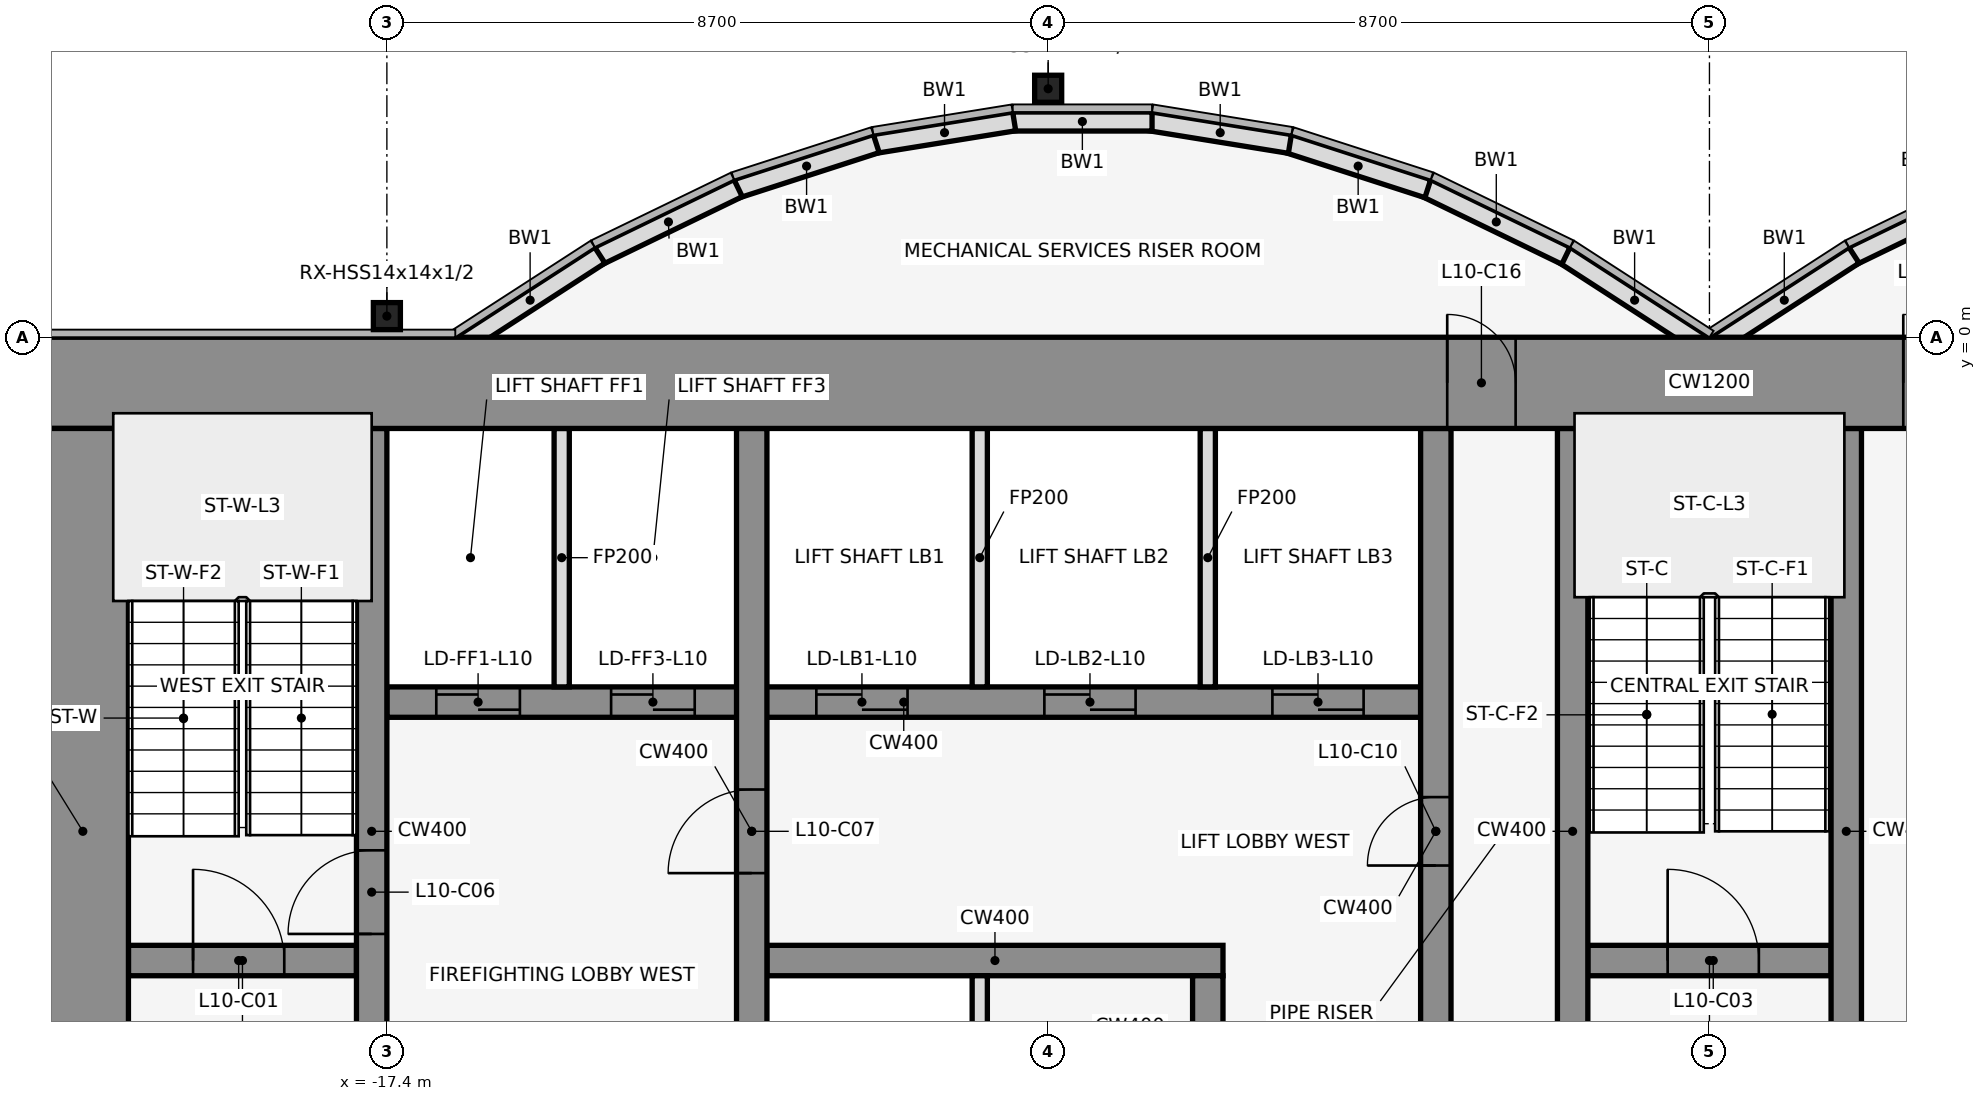
"""IFC4 building model, lengths in metres.
Left out: names, types, materials, properties, quantities, classifications, styles, units other than length and angle.
Written with IfcOpenShell. Run it as: python <this file> out.ifc"""

import sys

from ifc_helpers import new_model, si_unit, direction, frame, frame_2d, origin, origin_2d, place, context, subcontext, project, spatial, rectangle, hollow_rectangle, extrude, element, fill, save


model = new_model("IFC4")
c1 = context("Model", 3, precision=1e-05, world=origin(), true_north=direction((0.0, 1.0)))
c2 = subcontext(c1, "Body", "Model", "MODEL_VIEW")
j1 = project(units=[si_unit("LENGTHUNIT", "METRE"), si_unit("PLANEANGLEUNIT", "RADIAN")], contexts=[c1])
p1 = place(None, origin())
s1 = spatial("IfcSite", under=j1, at=p1, CompositionType="ELEMENT")
p2 = place(p1, origin())
s2 = spatial("IfcBuilding", under=s1, at=p2, CompositionType="ELEMENT")
p3 = place(p2, frame((0.0, 0.0, 53.0)))
s3 = spatial("IfcBuildingStorey", under=s2, at=p3, CompositionType="ELEMENT", Elevation=53.0)
for number, where, z_axis, x_axis in (
    (1, (-8.7, 3.269, 0.0), (0.0, 0.0, 1.0), (1.0, 0.0, 0.0)),
    (2, (-17.4, 0.278, 0.0), (0.0, 0.0, 1.0), (1.0, 0.0, 0.0)),
):
    element("IfcColumn", number, at=place(p3, frame(where, z_axis=z_axis, x_axis=x_axis)), inside=s3, PredefinedType="COLUMN", context=c2, shape_type="SweptSolid", body=[
        extrude(hollow_rectangle(XDim=0.356, YDim=0.356, WallThickness=0.012, at=origin_2d()), origin(), (0.0, 0.0, 1.0), 4.5),
    ])
p4 = place(p3, frame((3.721, 1.962, 0.0), z_axis=(0.0, 0.0, 1.0), x_axis=(-0.89982408427, -0.436252928206, 0.0)))
e3 = element("IfcWall", 3, at=p4, inside=s3, PredefinedType="STANDARD", context=c2, shape_type="SweptSolid", body=[
    extrude(rectangle(XDim=2.038, YDim=0.25, at=frame_2d((1.019, 0.0))), origin(), (0.0, 0.0, 1.0), 4.35),
])
for number, where, z_axis, x_axis in (
    (4, (1.901, 1.08, 0.0), (0.0, 0.0, 1.0), (-0.84, -0.543, 0.0)),
    (5, (-0.068, -0.105, 0.0), (0.0, 0.0, 1.0), (-0.84, 0.543, 0.0)),
):
    element("IfcWall", number, at=place(p3, frame(where, z_axis=z_axis, x_axis=x_axis)), inside=s3, PredefinedType="STANDARD", context=c2, shape_type="SweptSolid", body=[
        extrude(rectangle(XDim=2.183, YDim=0.25, at=frame_2d((1.091, 0.0))), origin(), (0.0, 0.0, 1.0), 4.35),
    ])
p5 = place(p3, frame((-1.888, 1.073, 0.0), z_axis=(0.0, 0.0, 1.0), x_axis=(-0.89982408427, 0.436252928206, 0.0)))
e6 = element("IfcWall", 6, at=p5, inside=s3, PredefinedType="STANDARD", context=c2, shape_type="SweptSolid", body=[
    extrude(rectangle(XDim=2.038, YDim=0.25, at=frame_2d((1.019, 0.0))), origin(), (0.0, 0.0, 1.0), 4.35),
])
p6 = place(p3, frame((-3.705, 1.955, 0.0), z_axis=(0.0, 0.0, 1.0), x_axis=(-0.951495806175, 0.307661714928, 0.0)))
e7 = element("IfcWall", 7, at=p6, inside=s3, PredefinedType="STANDARD", context=c2, shape_type="SweptSolid", body=[
    extrude(rectangle(XDim=1.927, YDim=0.25, at=frame_2d((0.963, 0.0))), origin(), (0.0, 0.0, 1.0), 4.35),
])
p7 = place(p3, frame((-5.52, 2.543, 0.0), z_axis=(0.0, 0.0, 1.0), x_axis=(-0.987181718931, 0.159600293885, 0.0)))
e8 = element("IfcWall", 8, at=p7, inside=s3, PredefinedType="STANDARD", context=c2, shape_type="SweptSolid", body=[
    extrude(rectangle(XDim=1.857, YDim=0.25, at=frame_2d((0.929, 0.0))), origin(), (0.0, 0.0, 1.0), 4.35),
])
p8 = place(p3, frame((-7.333, 2.838, 0.0), z_axis=(0.0, 0.0, 1.0), x_axis=(-1.0, 0.0, 0.0)))
e9 = element("IfcWall", 9, at=p8, inside=s3, PredefinedType="STANDARD", context=c2, shape_type="SweptSolid", body=[
    extrude(rectangle(XDim=1.833, YDim=0.25, at=frame_2d((0.917, 0.0))), origin(), (0.0, 0.0, 1.0), 4.35),
])
p9 = place(p3, frame((-9.147, 2.84, 0.0), z_axis=(0.0, 0.0, 1.0), x_axis=(-0.987181718931, -0.159600293885, 0.0)))
e10 = element("IfcWall", 10, at=p9, inside=s3, PredefinedType="STANDARD", context=c2, shape_type="SweptSolid", body=[
    extrude(rectangle(XDim=1.857, YDim=0.25, at=frame_2d((0.929, 0.0))), origin(), (0.0, 0.0, 1.0), 4.35),
])
p10 = place(p3, frame((-10.962, 2.548, 0.0), z_axis=(0.0, 0.0, 1.0), x_axis=(-0.951495806175, -0.307661714928, 0.0)))
e11 = element("IfcWall", 11, at=p10, inside=s3, PredefinedType="STANDARD", context=c2, shape_type="SweptSolid", body=[
    extrude(rectangle(XDim=1.927, YDim=0.25, at=frame_2d((0.963, 0.0))), origin(), (0.0, 0.0, 1.0), 4.35),
])
p11 = place(p3, frame((-12.779, 1.962, 0.0), z_axis=(0.0, 0.0, 1.0), x_axis=(-0.89982408427, -0.436252928206, 0.0)))
e12 = element("IfcWall", 12, at=p11, inside=s3, PredefinedType="STANDARD", context=c2, shape_type="SweptSolid", body=[
    extrude(rectangle(XDim=2.038, YDim=0.25, at=frame_2d((1.019, 0.0))), origin(), (0.0, 0.0, 1.0), 4.35),
])
p12 = place(p3, frame((-14.599, 1.08, 0.0), z_axis=(0.0, 0.0, 1.0), x_axis=(-0.83981312244, -0.542875602121, 0.0)))
e13 = element("IfcWall", 13, at=p12, inside=s3, PredefinedType="STANDARD", context=c2, shape_type="SweptSolid", body=[
    extrude(rectangle(XDim=2.183, YDim=0.25, at=frame_2d((1.091, 0.0))), origin(), (0.0, 0.0, 1.0), 4.35),
])
p13 = place(p3, frame((-20.8, -8.2, 0.0), z_axis=(0.0, 0.0, 1.0), x_axis=(1.0, 0.0, 0.0)))
e14 = element("IfcWall", 14, at=p13, inside=s3, PredefinedType="SHEAR", context=c2, shape_type="SweptSolid", body=[
    extrude(rectangle(XDim=3.0, YDim=0.4, at=frame_2d((1.5, 0.0))), origin(), (0.0, 0.0, 1.0), 4.5),
])
p14 = place(p13, frame((0.85, 0.0, 0.0)))
e15 = element("IfcOpeningElement", 15, at=p14, cuts=e14, PredefinedType="OPENING", context=c2, shape_type="SweptSolid", body=[
    extrude(rectangle(XDim=1.2, YDim=2.1, at=frame_2d((0.6, 1.05))), frame((0.0, 0.212, 0.0), z_axis=(0.0, -1.0, 0.0), x_axis=(1.0, 0.0, 0.0)), (0.0, 0.0, 1.0), 0.424),
])
p15 = place(p3, frame((-12.4, -8.2, 0.0), z_axis=(0.0, 0.0, 1.0), x_axis=(1.0, 0.0, 0.0)))
e16 = element("IfcWall", 16, at=p15, inside=s3, PredefinedType="SHEAR", context=c2, shape_type="SweptSolid", body=[
    extrude(rectangle(XDim=6.0, YDim=0.4, at=frame_2d((3.0, 0.0))), origin(), (0.0, 0.0, 1.0), 4.5),
])
p16 = place(p3, frame((-1.6, -8.2, 0.0), z_axis=(0.0, 0.0, 1.0), x_axis=(1.0, 0.0, 0.0)))
e17 = element("IfcWall", 17, at=p16, inside=s3, PredefinedType="SHEAR", context=c2, shape_type="SweptSolid", body=[
    extrude(rectangle(XDim=3.2, YDim=0.4, at=frame_2d((1.6, 0.0))), origin(), (0.0, 0.0, 1.0), 4.5),
])
p17 = place(p16, frame((1.05, 0.0, 0.0)))
e18 = element("IfcOpeningElement", 18, at=p17, cuts=e17, PredefinedType="OPENING", context=c2, shape_type="SweptSolid", body=[
    extrude(rectangle(XDim=1.2, YDim=2.1, at=frame_2d((0.6, 1.05))), frame((0.0, 0.212, 0.0), z_axis=(0.0, -1.0, 0.0), x_axis=(1.0, 0.0, 0.0)), (0.0, 0.0, 1.0), 0.424),
])
p18 = place(p3, frame((-17.4, -4.8, 0.0), z_axis=(0.0, 0.0, 1.0), x_axis=(1.0, 0.0, 0.0)))
e19 = element("IfcWall", 19, at=p18, inside=s3, PredefinedType="SHEAR", context=c2, shape_type="SweptSolid", body=[
    extrude(rectangle(XDim=13.6, YDim=0.4, at=frame_2d((6.8, 0.0))), origin(), (0.0, 0.0, 1.0), 4.5),
])
p19 = place(p18, frame((0.65, 0.0, 0.0)))
e20 = element("IfcOpeningElement", 20, at=p19, cuts=e19, PredefinedType="OPENING", context=c2, shape_type="SweptSolid", body=[
    extrude(rectangle(XDim=1.1, YDim=2.1, at=frame_2d((0.55, 1.05))), frame((0.0, 0.212, 0.0), z_axis=(0.0, -1.0, 0.0), x_axis=(1.0, 0.0, 0.0)), (0.0, 0.0, 1.0), 0.424),
])
p20 = place(p18, frame((2.95, 0.0, 0.0)))
e21 = element("IfcOpeningElement", 21, at=p20, cuts=e19, PredefinedType="OPENING", context=c2, shape_type="SweptSolid", body=[
    extrude(rectangle(XDim=1.1, YDim=2.1, at=frame_2d((0.55, 1.05))), frame((0.0, 0.212, 0.0), z_axis=(0.0, -1.0, 0.0), x_axis=(1.0, 0.0, 0.0)), (0.0, 0.0, 1.0), 0.424),
])
p21 = place(p18, frame((5.65, 0.0, 0.0)))
e22 = element("IfcOpeningElement", 22, at=p21, cuts=e19, PredefinedType="OPENING", context=c2, shape_type="SweptSolid", body=[
    extrude(rectangle(XDim=1.2, YDim=2.1, at=frame_2d((0.6, 1.05))), frame((0.0, 0.212, 0.0), z_axis=(0.0, -1.0, 0.0), x_axis=(1.0, 0.0, 0.0)), (0.0, 0.0, 1.0), 0.424),
])
p22 = place(p18, frame((8.65, 0.0, 0.0)))
e23 = element("IfcOpeningElement", 23, at=p22, cuts=e19, PredefinedType="OPENING", context=c2, shape_type="SweptSolid", body=[
    extrude(rectangle(XDim=1.2, YDim=2.1, at=frame_2d((0.6, 1.05))), frame((0.0, 0.212, 0.0), z_axis=(0.0, -1.0, 0.0), x_axis=(1.0, 0.0, 0.0)), (0.0, 0.0, 1.0), 0.424),
])
p23 = place(p18, frame((11.65, 0.0, 0.0)))
e24 = element("IfcOpeningElement", 24, at=p23, cuts=e19, PredefinedType="OPENING", context=c2, shape_type="SweptSolid", body=[
    extrude(rectangle(XDim=1.2, YDim=2.1, at=frame_2d((0.6, 1.05))), frame((0.0, 0.212, 0.0), z_axis=(0.0, -1.0, 0.0), x_axis=(1.0, 0.0, 0.0)), (0.0, 0.0, 1.0), 0.424),
])
p24 = place(p3, frame((-17.6, -11.8, 0.0), z_axis=(0.0, 0.0, 1.0), x_axis=(0.0, 1.0, 0.0)))
e25 = element("IfcWall", 25, at=p24, inside=s3, PredefinedType="SHEAR", context=c2, shape_type="SweptSolid", body=[
    extrude(rectangle(XDim=10.6, YDim=0.4, at=frame_2d((5.3, 0.0))), origin(), (0.0, 0.0, 1.0), 4.5),
])
p25 = place(p24, frame((1.25, 0.0, 0.0)))
e26 = element("IfcOpeningElement", 26, at=p25, cuts=e25, PredefinedType="OPENING", context=c2, shape_type="SweptSolid", body=[
    extrude(rectangle(XDim=1.1, YDim=2.1, at=frame_2d((0.55, 1.05))), frame((0.0, 0.212, 0.0), z_axis=(0.0, -1.0, 0.0), x_axis=(1.0, 0.0, 0.0)), (0.0, 0.0, 1.0), 0.424),
])
p26 = place(p24, frame((3.95, 0.0, 0.0)))
e27 = element("IfcOpeningElement", 27, at=p26, cuts=e25, PredefinedType="OPENING", context=c2, shape_type="SweptSolid", body=[
    extrude(rectangle(XDim=1.1, YDim=2.1, at=frame_2d((0.55, 1.05))), frame((0.0, 0.212, 0.0), z_axis=(0.0, -1.0, 0.0), x_axis=(1.0, 0.0, 0.0)), (0.0, 0.0, 1.0), 0.424),
])
p27 = place(p3, frame((-15.1, -4.6, 0.0), z_axis=(0.0, 0.0, 1.0), x_axis=(0.0, 1.0, 0.0)))
e28 = element("IfcWall", 28, at=p27, inside=s3, PredefinedType="PARTITIONING", context=c2, shape_type="SweptSolid", body=[
    extrude(rectangle(XDim=3.4, YDim=0.2, at=frame_2d((1.7, 0.0))), origin(), (0.0, 0.0, 1.0), 3.418),
])
p28 = place(p3, frame((-12.6, -11.8, 0.0), z_axis=(0.0, 0.0, 1.0), x_axis=(0.0, 1.0, 0.0)))
e29 = element("IfcWall", 29, at=p28, inside=s3, PredefinedType="SHEAR", context=c2, shape_type="SweptSolid", body=[
    extrude(rectangle(XDim=10.6, YDim=0.4, at=frame_2d((5.3, 0.0))), origin(), (0.0, 0.0, 1.0), 4.5),
])
p29 = place(p28, frame((4.75, 0.0, 0.0)))
e30 = element("IfcOpeningElement", 30, at=p29, cuts=e29, PredefinedType="OPENING", context=c2, shape_type="SweptSolid", body=[
    extrude(rectangle(XDim=1.1, YDim=2.1, at=frame_2d((0.55, 1.05))), frame((0.0, 0.212, 0.0), z_axis=(0.0, -1.0, 0.0), x_axis=(1.0, 0.0, 0.0)), (0.0, 0.0, 1.0), 0.424),
])
for number, where, z_axis, x_axis in (
    (31, (-9.6, -11.8, 0.0), (0.0, 0.0, 1.0), (0.0, 1.0, 0.0)),
    (32, (-9.6, -4.6, 0.0), (0.0, 0.0, 1.0), (0.0, 1.0, 0.0)),
):
    element("IfcWall", number, at=place(p3, frame(where, z_axis=z_axis, x_axis=x_axis)), inside=s3, PredefinedType="PARTITIONING", context=c2, shape_type="SweptSolid", body=[
        extrude(rectangle(XDim=3.4, YDim=0.2, at=frame_2d((1.7, 0.0))), origin(), (0.0, 0.0, 1.0), 3.418),
    ])
p30 = place(p3, frame((-6.6, -11.8, 0.0), z_axis=(0.0, 0.0, 1.0), x_axis=(0.0, 1.0, 0.0)))
e33 = element("IfcWall", 33, at=p30, inside=s3, PredefinedType="SHEAR", context=c2, shape_type="SweptSolid", body=[
    extrude(rectangle(XDim=3.4, YDim=0.4, at=frame_2d((1.7, 0.0))), origin(), (0.0, 0.0, 1.0), 4.5),
])
p31 = place(p30, frame((1.25, 0.0, 0.0)))
e34 = element("IfcOpeningElement", 34, at=p31, cuts=e33, PredefinedType="OPENING", context=c2, shape_type="SweptSolid", body=[
    extrude(rectangle(XDim=0.9, YDim=2.1, at=frame_2d((0.45, 1.05))), frame((0.0, 0.212, 0.0), z_axis=(0.0, -1.0, 0.0), x_axis=(1.0, 0.0, 0.0)), (0.0, 0.0, 1.0), 0.424),
])
p32 = place(p3, frame((-6.6, -4.6, 0.0), z_axis=(0.0, 0.0, 1.0), x_axis=(0.0, 1.0, 0.0)))
e35 = element("IfcWall", 35, at=p32, inside=s3, PredefinedType="PARTITIONING", context=c2, shape_type="SweptSolid", body=[
    extrude(rectangle(XDim=3.4, YDim=0.2, at=frame_2d((1.7, 0.0))), origin(), (0.0, 0.0, 1.0), 3.418),
])
p33 = place(p3, frame((-3.6, -11.8, 0.0), z_axis=(0.0, 0.0, 1.0), x_axis=(0.0, 1.0, 0.0)))
e36 = element("IfcWall", 36, at=p33, inside=s3, PredefinedType="SHEAR", context=c2, shape_type="SweptSolid", body=[
    extrude(rectangle(XDim=10.6, YDim=0.4, at=frame_2d((5.3, 0.0))), origin(), (0.0, 0.0, 1.0), 4.5),
])
p34 = place(p33, frame((4.85, 0.0, 0.0)))
e37 = element("IfcOpeningElement", 37, at=p34, cuts=e36, PredefinedType="OPENING", context=c2, shape_type="SweptSolid", body=[
    extrude(rectangle(XDim=0.9, YDim=2.1, at=frame_2d((0.45, 1.05))), frame((0.0, 0.212, 0.0), z_axis=(0.0, -1.0, 0.0), x_axis=(1.0, 0.0, 0.0)), (0.0, 0.0, 1.0), 0.424),
])
for number, where, z_axis, x_axis in (
    (38, (-1.8, -11.8, 0.0), (0.0, 0.0, 1.0), (0.0, 1.0, 0.0)),
    (39, (1.8, -11.8, 0.0), (0.0, 0.0, 1.0), (0.0, 1.0, 0.0)),
):
    element("IfcWall", number, at=place(p3, frame(where, z_axis=z_axis, x_axis=x_axis)), inside=s3, PredefinedType="SHEAR", context=c2, shape_type="SweptSolid", body=[
        extrude(rectangle(XDim=10.6, YDim=0.4, at=frame_2d((5.3, 0.0))), origin(), (0.0, 0.0, 1.0), 4.5),
    ])
p35 = place(p3, frame((-22.0, -0.6, 0.0), z_axis=(0.0, 0.0, 1.0), x_axis=(1.0, 0.0, 0.0)))
e40 = element("IfcWall", 40, at=p35, inside=s3, PredefinedType="SHEAR", context=c2, shape_type="SweptSolid", body=[
    extrude(rectangle(XDim=44.0, YDim=1.2, at=frame_2d((22.0, 0.0))), origin(), (0.0, 0.0, 1.0), 4.5),
])
p36 = place(p35, frame((18.55, 0.0, 0.0)))
e41 = element("IfcOpeningElement", 41, at=p36, cuts=e40, PredefinedType="OPENING", context=c2, shape_type="SweptSolid", body=[
    extrude(rectangle(XDim=0.9, YDim=2.1, at=frame_2d((0.45, 1.05))), frame((0.0, 0.612, 0.0), z_axis=(0.0, -1.0, 0.0), x_axis=(1.0, 0.0, 0.0)), (0.0, 0.0, 1.0), 1.224),
])
p37 = place(p35, frame((24.55, 0.0, 0.0)))
e42 = element("IfcOpeningElement", 42, at=p37, cuts=e40, PredefinedType="OPENING", context=c2, shape_type="SweptSolid", body=[
    extrude(rectangle(XDim=0.9, YDim=2.1, at=frame_2d((0.45, 1.05))), frame((0.0, 0.612, 0.0), z_axis=(0.0, -1.0, 0.0), x_axis=(1.0, 0.0, 0.0)), (0.0, 0.0, 1.0), 1.224),
])
p38 = place(p3, frame((-21.4, -11.8, 0.0), z_axis=(0.0, 0.0, 1.0), x_axis=(0.0, 1.0, 0.0)))
e43 = element("IfcWall", 43, at=p38, inside=s3, PredefinedType="SHEAR", context=c2, shape_type="SweptSolid", body=[
    extrude(rectangle(XDim=10.6, YDim=1.2, at=frame_2d((5.3, 0.0))), origin(), (0.0, 0.0, 1.0), 4.5),
])
p39 = place(p14, origin())
e44 = element("IfcDoor", 44, at=p39, inside=s3, OperationType="SINGLE_SWING_LEFT", PredefinedType="DOOR", context=c2, shape_type="SweptSolid", body=[
    extrude(rectangle(XDim=1.2, YDim=2.1, at=frame_2d((0.6, 1.05))), frame((0.0, 0.025, 0.0), z_axis=(0.0, -1.0, 0.0), x_axis=(1.0, 0.0, 0.0)), (0.0, 0.0, 1.0), 0.05),
])
fill(e15, e44)
p40 = place(p17, origin())
e45 = element("IfcDoor", 45, at=p40, inside=s3, OperationType="SINGLE_SWING_LEFT", PredefinedType="DOOR", context=c2, shape_type="SweptSolid", body=[
    extrude(rectangle(XDim=1.2, YDim=2.1, at=frame_2d((0.6, 1.05))), frame((0.0, 0.025, 0.0), z_axis=(0.0, -1.0, 0.0), x_axis=(1.0, 0.0, 0.0)), (0.0, 0.0, 1.0), 0.05),
])
fill(e18, e45)
p41 = place(p19, origin())
e46 = element("IfcDoor", 46, at=p41, inside=s3, OperationType="DOUBLE_DOOR_SLIDING", PredefinedType="DOOR", context=c2, shape_type="SweptSolid", body=[
    extrude(rectangle(XDim=1.1, YDim=2.1, at=frame_2d((0.55, 1.05))), frame((0.0, 0.025, 0.0), z_axis=(0.0, -1.0, 0.0), x_axis=(1.0, 0.0, 0.0)), (0.0, 0.0, 1.0), 0.05),
])
fill(e20, e46)
p42 = place(p20, origin())
e47 = element("IfcDoor", 47, at=p42, inside=s3, OperationType="DOUBLE_DOOR_SLIDING", PredefinedType="DOOR", context=c2, shape_type="SweptSolid", body=[
    extrude(rectangle(XDim=1.1, YDim=2.1, at=frame_2d((0.55, 1.05))), frame((0.0, 0.025, 0.0), z_axis=(0.0, -1.0, 0.0), x_axis=(1.0, 0.0, 0.0)), (0.0, 0.0, 1.0), 0.05),
])
fill(e21, e47)
p43 = place(p21, origin())
e48 = element("IfcDoor", 48, at=p43, inside=s3, OperationType="DOUBLE_DOOR_SLIDING", PredefinedType="DOOR", context=c2, shape_type="SweptSolid", body=[
    extrude(rectangle(XDim=1.2, YDim=2.1, at=frame_2d((0.6, 1.05))), frame((0.0, 0.025, 0.0), z_axis=(0.0, -1.0, 0.0), x_axis=(1.0, 0.0, 0.0)), (0.0, 0.0, 1.0), 0.05),
])
fill(e22, e48)
p44 = place(p22, origin())
e49 = element("IfcDoor", 49, at=p44, inside=s3, OperationType="DOUBLE_DOOR_SLIDING", PredefinedType="DOOR", context=c2, shape_type="SweptSolid", body=[
    extrude(rectangle(XDim=1.2, YDim=2.1, at=frame_2d((0.6, 1.05))), frame((0.0, 0.025, 0.0), z_axis=(0.0, -1.0, 0.0), x_axis=(1.0, 0.0, 0.0)), (0.0, 0.0, 1.0), 0.05),
])
fill(e23, e49)
p45 = place(p23, origin())
e50 = element("IfcDoor", 50, at=p45, inside=s3, OperationType="DOUBLE_DOOR_SLIDING", PredefinedType="DOOR", context=c2, shape_type="SweptSolid", body=[
    extrude(rectangle(XDim=1.2, YDim=2.1, at=frame_2d((0.6, 1.05))), frame((0.0, 0.025, 0.0), z_axis=(0.0, -1.0, 0.0), x_axis=(1.0, 0.0, 0.0)), (0.0, 0.0, 1.0), 0.05),
])
fill(e24, e50)
p46 = place(p26, frame((1.1, 0.0, 0.0), z_axis=(0.0, 0.0, 1.0), x_axis=(-1.0, 0.0, 0.0)))
e51 = element("IfcDoor", 51, at=p46, inside=s3, OperationType="SINGLE_SWING_LEFT", PredefinedType="DOOR", context=c2, shape_type="SweptSolid", body=[
    extrude(rectangle(XDim=1.1, YDim=2.1, at=frame_2d((0.55, 1.05))), frame((0.0, 0.025, 0.0), z_axis=(0.0, -1.0, 0.0), x_axis=(1.0, 0.0, 0.0)), (0.0, 0.0, 1.0), 0.05),
])
fill(e27, e51)
p47 = place(p29, origin())
e52 = element("IfcDoor", 52, at=p47, inside=s3, OperationType="SINGLE_SWING_LEFT", PredefinedType="DOOR", context=c2, shape_type="SweptSolid", body=[
    extrude(rectangle(XDim=1.1, YDim=2.1, at=frame_2d((0.55, 1.05))), frame((0.0, 0.025, 0.0), z_axis=(0.0, -1.0, 0.0), x_axis=(1.0, 0.0, 0.0)), (0.0, 0.0, 1.0), 0.05),
])
fill(e30, e52)
p48 = place(p34, frame((0.9, 0.0, 0.0), z_axis=(0.0, 0.0, 1.0), x_axis=(-1.0, 0.0, 0.0)))
e53 = element("IfcDoor", 53, at=p48, inside=s3, OperationType="SINGLE_SWING_LEFT", PredefinedType="DOOR", context=c2, shape_type="SweptSolid", body=[
    extrude(rectangle(XDim=0.9, YDim=2.1, at=frame_2d((0.45, 1.05))), frame((0.0, 0.025, 0.0), z_axis=(0.0, -1.0, 0.0), x_axis=(1.0, 0.0, 0.0)), (0.0, 0.0, 1.0), 0.05),
])
fill(e37, e53)
p49 = place(p36, origin())
e54 = element("IfcDoor", 54, at=p49, inside=s3, OperationType="SINGLE_SWING_LEFT", PredefinedType="DOOR", context=c2, shape_type="SweptSolid", body=[
    extrude(rectangle(XDim=0.9, YDim=2.1, at=frame_2d((0.45, 1.05))), frame((0.0, 0.025, 0.0), z_axis=(0.0, -1.0, 0.0), x_axis=(1.0, 0.0, 0.0)), (0.0, 0.0, 1.0), 0.05),
])
fill(e41, e54)
p50 = place(p37, origin())
e55 = element("IfcDoor", 55, at=p50, inside=s3, OperationType="SINGLE_SWING_LEFT", PredefinedType="DOOR", context=c2, shape_type="SweptSolid", body=[
    extrude(rectangle(XDim=0.9, YDim=2.1, at=frame_2d((0.45, 1.05))), frame((0.0, 0.025, 0.0), z_axis=(0.0, -1.0, 0.0), x_axis=(1.0, 0.0, 0.0)), (0.0, 0.0, 1.0), 0.05),
])
fill(e42, e55)
save(model, sys.argv[1])
